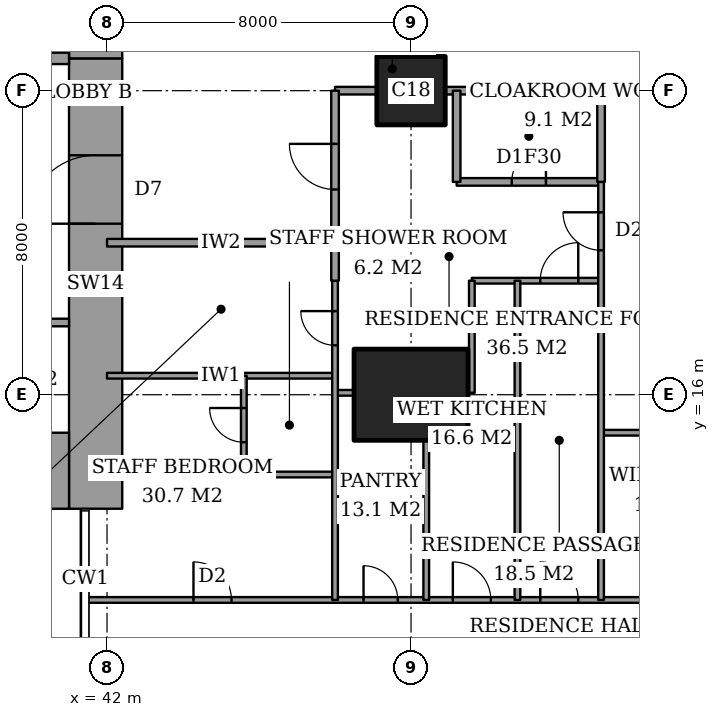
"""IFC4 building model, lengths in metres.
Left out: names, types, materials, properties, quantities, classifications, styles, units other than length and angle.
Written with IfcOpenShell. Run it as: python <this file> out.ifc"""

import sys

from ifc_helpers import new_model, si_unit, direction, frame, frame_2d, origin, origin_2d, place, context, subcontext, project, spatial, rectangle, extrude, element, fill, save


model = new_model("IFC4")
c1 = context("Model", 3, precision=1e-05, world=origin(), true_north=direction((0.0, 1.0)))
c2 = subcontext(c1, "Body", "Model", "MODEL_VIEW")
j1 = project(units=[si_unit("LENGTHUNIT", "METRE"), si_unit("PLANEANGLEUNIT", "RADIAN")], contexts=[c1])
p1 = place(None, origin())
s1 = spatial("IfcSite", under=j1, at=p1, CompositionType="ELEMENT")
p2 = place(p1, origin())
s2 = spatial("IfcBuilding", under=s1, at=p2, CompositionType="ELEMENT")
p3 = place(p2, frame((0.0, 0.0, 193.0)))
s3 = spatial("IfcBuildingStorey", under=s2, at=p3, CompositionType="ELEMENT", Elevation=193.0)
p4 = place(p3, frame((50.0, 16.0, 0.0), z_axis=(0.0, 0.0, 1.0), x_axis=(1.0, 0.0, 0.0)))
e1 = element("IfcColumn", 1, at=p4, inside=s3, PredefinedType="COLUMN", context=c2, shape_type="SweptSolid", body=[
    extrude(rectangle(XDim=3.0, YDim=2.4, at=origin_2d()), origin(), (0.0, 0.0, 1.0), 3.6),
])
p5 = place(p3, frame((50.0, 24.0, 0.0), z_axis=(0.0, 0.0, 1.0), x_axis=(1.0, 0.0, 0.0)))
e2 = element("IfcColumn", 2, at=p5, inside=s3, PredefinedType="COLUMN", context=c2, shape_type="SweptSolid", body=[
    extrude(rectangle(XDim=1.8, YDim=1.8, at=origin_2d()), origin(), (0.0, 0.0, 1.0), 3.6),
])
p6 = place(p3, frame((37.85, 14.0, 0.0), z_axis=(0.0, 0.0, 1.0), x_axis=(1.0, 0.0, 0.0)))
e3 = element("IfcWall", 3, at=p6, inside=s3, PredefinedType="SHEAR", context=c2, shape_type="SweptSolid", body=[
    extrude(rectangle(XDim=3.15, YDim=2.0, at=frame_2d((1.575, 0.0))), origin(), (0.0, 0.0, 1.0), 3.6),
])
p7 = place(p3, frame((41.7, 13.0, 0.0), z_axis=(0.0, 0.0, 1.0), x_axis=(0.0, 1.0, 0.0)))
e4 = element("IfcWall", 4, at=p7, inside=s3, PredefinedType="SHEAR", context=c2, shape_type="SweptSolid", body=[
    extrude(rectangle(XDim=11.85, YDim=1.4, at=frame_2d((5.925, 0.0))), origin(), (0.0, 0.0, 1.0), 3.6),
])
p8 = place(p7, frame((7.5, 0.0, 0.0)))
e5 = element("IfcOpeningElement", 5, at=p8, cuts=e4, PredefinedType="OPENING", context=c2, shape_type="SweptSolid", body=[
    extrude(rectangle(XDim=1.8, YDim=2.4, at=frame_2d((0.9, 1.2))), frame((0.0, 0.71, 0.0), z_axis=(0.0, -1.0, 0.0), x_axis=(1.0, 0.0, 0.0)), (0.0, 0.0, 1.0), 1.42),
])
p9 = place(p3, frame((41.7, 24.85, 0.0), z_axis=(0.0, 0.0, 1.0), x_axis=(0.0, 1.0, 0.0)))
e6 = element("IfcWall", 6, at=p9, inside=s3, PredefinedType="SHEAR", context=c2, shape_type="SweptSolid", body=[
    extrude(rectangle(XDim=10.15, YDim=1.4, at=frame_2d((5.075, 0.0))), origin(), (0.0, 0.0, 1.0), 3.6),
])
p10 = place(p3, frame((37.85, 24.85, 0.0), z_axis=(0.0, 0.0, 1.0), x_axis=(1.0, 0.0, 0.0)))
e7 = element("IfcWall", 7, at=p10, inside=s3, PredefinedType="SHEAR", context=c2, shape_type="SweptSolid", body=[
    extrude(rectangle(XDim=3.15, YDim=0.3, at=frame_2d((1.575, 0.0))), origin(), (0.0, 0.0, 1.0), 3.6),
])
p11 = place(p10, frame((0.95, 0.0, 0.0)))
e8 = element("IfcOpeningElement", 8, at=p11, cuts=e7, PredefinedType="OPENING", context=c2, shape_type="SweptSolid", body=[
    extrude(rectangle(XDim=1.0, YDim=2.1, at=frame_2d((0.5, 1.05))), frame((0.0, 0.16, 0.0), z_axis=(0.0, -1.0, 0.0), x_axis=(1.0, 0.0, 0.0)), (0.0, 0.0, 1.0), 0.32),
])
p12 = place(p3, frame((41.439, 10.6, 0.0), z_axis=(0.0, 0.0, 1.0), x_axis=(1.0, 0.0, 0.0)))
e9 = element("IfcWall", 9, at=p12, inside=s3, PredefinedType="PARTITIONING", context=c2, shape_type="SweptSolid", body=[
    extrude(rectangle(XDim=25.011, YDim=0.15, at=frame_2d((12.505, 0.0))), origin(), (0.0, 0.0, 1.0), 3.35),
])
p13 = place(p12, frame((11.961, 0.0, 0.0)))
e10 = element("IfcOpeningElement", 10, at=p13, cuts=e9, PredefinedType="OPENING", context=c2, shape_type="SweptSolid", body=[
    extrude(rectangle(XDim=1.0, YDim=2.1, at=frame_2d((0.5, 1.05))), frame((0.0, 0.085, 0.0), z_axis=(0.0, -1.0, 0.0), x_axis=(1.0, 0.0, 0.0)), (0.0, 0.0, 1.0), 0.17),
])
p14 = place(p12, frame((20.924, 0.0, 0.0)))
e11 = element("IfcOpeningElement", 11, at=p14, cuts=e9, PredefinedType="OPENING", context=c2, shape_type="SweptSolid", body=[
    extrude(rectangle(XDim=1.0, YDim=2.1, at=frame_2d((0.5, 1.05))), frame((0.0, 0.085, 0.0), z_axis=(0.0, -1.0, 0.0), x_axis=(1.0, 0.0, 0.0)), (0.0, 0.0, 1.0), 0.17),
])
p15 = place(p12, frame((15.249, 0.0, 0.0)))
e12 = element("IfcOpeningElement", 12, at=p15, cuts=e9, PredefinedType="OPENING", context=c2, shape_type="SweptSolid", body=[
    extrude(rectangle(XDim=0.9, YDim=2.1, at=frame_2d((0.45, 1.05))), frame((0.0, 0.085, 0.0), z_axis=(0.0, -1.0, 0.0), x_axis=(1.0, 0.0, 0.0)), (0.0, 0.0, 1.0), 0.17),
])
p16 = place(p12, frame((9.661, 0.0, 0.0)))
e13 = element("IfcOpeningElement", 13, at=p16, cuts=e9, PredefinedType="OPENING", context=c2, shape_type="SweptSolid", body=[
    extrude(rectangle(XDim=1.0, YDim=2.1, at=frame_2d((0.5, 1.05))), frame((0.0, 0.085, 0.0), z_axis=(0.0, -1.0, 0.0), x_axis=(1.0, 0.0, 0.0)), (0.0, 0.0, 1.0), 0.17),
])
p17 = place(p12, frame((7.311, 0.0, 0.0)))
e14 = element("IfcOpeningElement", 14, at=p17, cuts=e9, PredefinedType="OPENING", context=c2, shape_type="SweptSolid", body=[
    extrude(rectangle(XDim=0.9, YDim=2.1, at=frame_2d((0.45, 1.05))), frame((0.0, 0.085, 0.0), z_axis=(0.0, -1.0, 0.0), x_axis=(1.0, 0.0, 0.0)), (0.0, 0.0, 1.0), 0.17),
])
p18 = place(p12, frame((2.836, 0.0, 0.0)))
e15 = element("IfcOpeningElement", 15, at=p18, cuts=e9, PredefinedType="OPENING", context=c2, shape_type="SweptSolid", body=[
    extrude(rectangle(XDim=1.0, YDim=2.1, at=frame_2d((0.5, 1.05))), frame((0.0, 0.085, 0.0), z_axis=(0.0, -1.0, 0.0), x_axis=(1.0, 0.0, 0.0)), (0.0, 0.0, 1.0), 0.17),
])
p19 = place(p3, frame((45.6, 13.9, 0.0), z_axis=(0.0, 0.0, 1.0), x_axis=(1.0, 0.0, 0.0)))
e16 = element("IfcWall", 16, at=p19, inside=s3, PredefinedType="PARTITIONING", context=c2, shape_type="SweptSolid", body=[
    extrude(rectangle(XDim=2.4, YDim=0.15, at=frame_2d((1.2, 0.0))), origin(), (0.0, 0.0, 1.0), 3.35),
])
p20 = place(p3, frame((55.0, 15.0, 0.0), z_axis=(0.0, 0.0, 1.0), x_axis=(1.0, 0.0, 0.0)))
e17 = element("IfcWall", 17, at=p20, inside=s3, PredefinedType="PARTITIONING", context=c2, shape_type="SweptSolid", body=[
    extrude(rectangle(XDim=1.5, YDim=0.15, at=frame_2d((0.75, 0.0))), origin(), (0.0, 0.0, 1.0), 3.35),
])
p21 = place(p3, frame((48.0, 16.05, 0.0), z_axis=(0.0, 0.0, 1.0), x_axis=(1.0, 0.0, 0.0)))
e18 = element("IfcWall", 18, at=p21, inside=s3, PredefinedType="PARTITIONING", context=c2, shape_type="SweptSolid", body=[
    extrude(rectangle(XDim=0.5, YDim=0.15, at=frame_2d((0.25, 0.0))), origin(), (0.0, 0.0, 1.0), 2.634),
])
p22 = place(p3, frame((42.0, 16.5, 0.0), z_axis=(0.0, 0.0, 1.0), x_axis=(1.0, 0.0, 0.0)))
e19 = element("IfcWall", 19, at=p22, inside=s3, PredefinedType="PARTITIONING", context=c2, shape_type="SweptSolid", body=[
    extrude(rectangle(XDim=6.0, YDim=0.15, at=frame_2d((3.0, 0.0))), origin(), (0.0, 0.0, 1.0), 3.35),
])
p23 = place(p3, frame((51.6, 19.0, 0.0), z_axis=(0.0, 0.0, 1.0), x_axis=(1.0, 0.0, 0.0)))
e20 = element("IfcWall", 20, at=p23, inside=s3, PredefinedType="PARTITIONING", context=c2, shape_type="SweptSolid", body=[
    extrude(rectangle(XDim=3.4, YDim=0.15, at=frame_2d((1.7, 0.0))), origin(), (0.0, 0.0, 1.0), 3.35),
])
p24 = place(p23, frame((1.8, 0.0, 0.0)))
e21 = element("IfcOpeningElement", 21, at=p24, cuts=e20, PredefinedType="OPENING", context=c2, shape_type="SweptSolid", body=[
    extrude(rectangle(XDim=1.0, YDim=2.1, at=frame_2d((0.5, 1.05))), frame((0.0, 0.085, 0.0), z_axis=(0.0, -1.0, 0.0), x_axis=(1.0, 0.0, 0.0)), (0.0, 0.0, 1.0), 0.17),
])
p25 = place(p3, frame((42.0, 20.0, 0.0), z_axis=(0.0, 0.0, 1.0), x_axis=(1.0, 0.0, 0.0)))
e22 = element("IfcWall", 22, at=p25, inside=s3, PredefinedType="PARTITIONING", context=c2, shape_type="SweptSolid", body=[
    extrude(rectangle(XDim=6.0, YDim=0.2, at=frame_2d((3.0, 0.0))), origin(), (0.0, 0.0, 1.0), 3.35),
])
p26 = place(p3, frame((51.2, 21.6, 0.0), z_axis=(0.0, 0.0, 1.0), x_axis=(1.0, 0.0, 0.0)))
e23 = element("IfcWall", 23, at=p26, inside=s3, PredefinedType="PARTITIONING", context=c2, shape_type="SweptSolid", body=[
    extrude(rectangle(XDim=3.8, YDim=0.2, at=frame_2d((1.9, 0.0))), origin(), (0.0, 0.0, 1.0), 3.35),
])
p27 = place(p26, frame((1.45, 0.0, 0.0)))
e24 = element("IfcOpeningElement", 24, at=p27, cuts=e23, PredefinedType="OPENING", context=c2, shape_type="SweptSolid", body=[
    extrude(rectangle(XDim=0.9, YDim=2.1, at=frame_2d((0.45, 1.05))), frame((0.0, 0.11, 0.0), z_axis=(0.0, -1.0, 0.0), x_axis=(1.0, 0.0, 0.0)), (0.0, 0.0, 1.0), 0.22),
])
p28 = place(p3, frame((48.0, 24.0, 0.0), z_axis=(0.0, 0.0, 1.0), x_axis=(1.0, 0.0, 0.0)))
e25 = element("IfcWall", 25, at=p28, inside=s3, PredefinedType="PARTITIONING", context=c2, shape_type="SweptSolid", body=[
    extrude(rectangle(XDim=1.1, YDim=0.2, at=frame_2d((0.55, 0.0))), origin(), (0.0, 0.0, 1.0), 3.35),
])
p29 = place(p3, frame((50.9, 24.0, 0.0), z_axis=(0.0, 0.0, 1.0), x_axis=(1.0, 0.0, 0.0)))
e26 = element("IfcWall", 26, at=p29, inside=s3, PredefinedType="PARTITIONING", context=c2, shape_type="SweptSolid", body=[
    extrude(rectangle(XDim=6.2, YDim=0.2, at=frame_2d((3.1, 0.0))), origin(), (0.0, 0.0, 1.0), 3.35),
])
p30 = place(p3, frame((45.6, 13.9, 0.0), z_axis=(0.0, 0.0, 1.0), x_axis=(0.0, 1.0, 0.0)))
e27 = element("IfcWall", 27, at=p30, inside=s3, PredefinedType="PARTITIONING", context=c2, shape_type="SweptSolid", body=[
    extrude(rectangle(XDim=2.6, YDim=0.15, at=frame_2d((1.3, 0.0))), origin(), (0.0, 0.0, 1.0), 3.35),
])
p31 = place(p30, frame((0.85, 0.0, 0.0)))
e28 = element("IfcOpeningElement", 28, at=p31, cuts=e27, PredefinedType="OPENING", context=c2, shape_type="SweptSolid", body=[
    extrude(rectangle(XDim=0.9, YDim=2.1, at=frame_2d((0.45, 1.05))), frame((0.0, 0.085, 0.0), z_axis=(0.0, -1.0, 0.0), x_axis=(1.0, 0.0, 0.0)), (0.0, 0.0, 1.0), 0.17),
])
p32 = place(p3, frame((48.0, 19.0, 0.0), z_axis=(0.0, 0.0, 1.0), x_axis=(0.0, 1.0, 0.0)))
e29 = element("IfcWall", 29, at=p32, inside=s3, PredefinedType="PARTITIONING", context=c2, shape_type="SweptSolid", body=[
    extrude(rectangle(XDim=5.0, YDim=0.2, at=frame_2d((2.5, 0.0))), origin(), (0.0, 0.0, 1.0), 3.35),
])
p33 = place(p32, frame((2.4, 0.0, 0.0)))
e30 = element("IfcOpeningElement", 30, at=p33, cuts=e29, PredefinedType="OPENING", context=c2, shape_type="SweptSolid", body=[
    extrude(rectangle(XDim=1.2, YDim=2.4, at=frame_2d((0.6, 1.2))), frame((0.0, 0.11, 0.0), z_axis=(0.0, -1.0, 0.0), x_axis=(1.0, 0.0, 0.0)), (0.0, 0.0, 1.0), 0.22),
])
p34 = place(p3, frame((48.0, 10.6, 0.0), z_axis=(0.0, 0.0, 1.0), x_axis=(0.0, 1.0, 0.0)))
e31 = element("IfcWall", 31, at=p34, inside=s3, PredefinedType="PARTITIONING", context=c2, shape_type="SweptSolid", body=[
    extrude(rectangle(XDim=8.4, YDim=0.15, at=frame_2d((4.2, 0.0))), origin(), (0.0, 0.0, 1.0), 3.35),
])
p35 = place(p34, frame((6.7, 0.0, 0.0)))
e32 = element("IfcOpeningElement", 32, at=p35, cuts=e31, PredefinedType="OPENING", context=c2, shape_type="SweptSolid", body=[
    extrude(rectangle(XDim=0.9, YDim=2.1, at=frame_2d((0.45, 1.05))), frame((0.0, 0.085, 0.0), z_axis=(0.0, -1.0, 0.0), x_axis=(1.0, 0.0, 0.0)), (0.0, 0.0, 1.0), 0.17),
])
p36 = place(p3, frame((50.4, 10.6, 0.0), z_axis=(0.0, 0.0, 1.0), x_axis=(0.0, 1.0, 0.0)))
e33 = element("IfcWall", 33, at=p36, inside=s3, PredefinedType="PARTITIONING", context=c2, shape_type="SweptSolid", body=[
    extrude(rectangle(XDim=4.2, YDim=0.15, at=frame_2d((2.1, 0.0))), origin(), (0.0, 0.0, 1.0), 3.35),
])
p37 = place(p3, frame((51.2, 21.6, 0.0), z_axis=(0.0, 0.0, 1.0), x_axis=(0.0, 1.0, 0.0)))
e34 = element("IfcWall", 34, at=p37, inside=s3, PredefinedType="PARTITIONING", context=c2, shape_type="SweptSolid", body=[
    extrude(rectangle(XDim=2.4, YDim=0.2, at=frame_2d((1.2, 0.0))), origin(), (0.0, 0.0, 1.0), 3.35),
])
p38 = place(p3, frame((51.6, 16.05, 0.0), z_axis=(0.0, 0.0, 1.0), x_axis=(0.0, 1.0, 0.0)))
e35 = element("IfcWall", 35, at=p38, inside=s3, PredefinedType="PARTITIONING", context=c2, shape_type="SweptSolid", body=[
    extrude(rectangle(XDim=2.95, YDim=0.15, at=frame_2d((1.475, 0.0))), origin(), (0.0, 0.0, 1.0), 3.35),
])
p39 = place(p3, frame((52.8, 10.6, 0.0), z_axis=(0.0, 0.0, 1.0), x_axis=(0.0, 1.0, 0.0)))
e36 = element("IfcWall", 36, at=p39, inside=s3, PredefinedType="PARTITIONING", context=c2, shape_type="SweptSolid", body=[
    extrude(rectangle(XDim=8.4, YDim=0.15, at=frame_2d((4.2, 0.0))), origin(), (0.0, 0.0, 1.0), 3.35),
])
p40 = place(p3, frame((55.0, 21.6, 0.0), z_axis=(0.0, 0.0, 1.0), x_axis=(0.0, 1.0, 0.0)))
e37 = element("IfcWall", 37, at=p40, inside=s3, PredefinedType="PARTITIONING", context=c2, shape_type="SweptSolid", body=[
    extrude(rectangle(XDim=2.4, YDim=0.2, at=frame_2d((1.2, 0.0))), origin(), (0.0, 0.0, 1.0), 3.35),
])
p41 = place(p3, frame((55.0, 10.6, 0.0), z_axis=(0.0, 0.0, 1.0), x_axis=(0.0, 1.0, 0.0)))
e38 = element("IfcWall", 38, at=p41, inside=s3, PredefinedType="PARTITIONING", context=c2, shape_type="SweptSolid", body=[
    extrude(rectangle(XDim=11.0, YDim=0.15, at=frame_2d((5.5, 0.0))), origin(), (0.0, 0.0, 1.0), 3.35),
])
p42 = place(p41, frame((9.2, 0.0, 0.0)))
e39 = element("IfcOpeningElement", 39, at=p42, cuts=e38, PredefinedType="OPENING", context=c2, shape_type="SweptSolid", body=[
    extrude(rectangle(XDim=1.0, YDim=2.1, at=frame_2d((0.5, 1.05))), frame((0.0, 0.085, 0.0), z_axis=(0.0, -1.0, 0.0), x_axis=(1.0, 0.0, 0.0)), (0.0, 0.0, 1.0), 0.17),
])
p43 = place(p3, frame((28.3, 17.9, 0.0), z_axis=(0.0, 0.0, 1.0), x_axis=(1.0, 0.0, 0.0)))
e40 = element("IfcWall", 40, at=p43, inside=s3, PredefinedType="PARTITIONING", context=c2, shape_type="SweptSolid", body=[
    extrude(rectangle(XDim=12.7, YDim=0.2, at=frame_2d((6.35, 0.0))), origin(), (0.0, 0.0, 1.0), 3.6),
])
p44 = place(p43, frame((1.05, 0.0, 0.0)))
e41 = element("IfcOpeningElement", 41, at=p44, cuts=e40, PredefinedType="OPENING", context=c2, shape_type="SweptSolid", body=[
    extrude(rectangle(XDim=0.9, YDim=2.1, at=frame_2d((0.45, 1.05))), frame((0.0, 0.11, 0.0), z_axis=(0.0, -1.0, 0.0), x_axis=(1.0, 0.0, 0.0)), (0.0, 0.0, 1.0), 0.22),
])
p45 = place(p43, frame((4.2, 0.0, 0.0)))
e42 = element("IfcOpeningElement", 42, at=p45, cuts=e40, PredefinedType="OPENING", context=c2, shape_type="SweptSolid", body=[
    extrude(rectangle(XDim=1.0, YDim=2.1, at=frame_2d((0.5, 1.05))), frame((0.0, 0.11, 0.0), z_axis=(0.0, -1.0, 0.0), x_axis=(1.0, 0.0, 0.0)), (0.0, 0.0, 1.0), 0.22),
])
p46 = place(p43, frame((10.6, 0.0, 0.0)))
e43 = element("IfcOpeningElement", 43, at=p46, cuts=e40, PredefinedType="OPENING", context=c2, shape_type="SweptSolid", body=[
    extrude(rectangle(XDim=1.2, YDim=2.1, at=frame_2d((0.6, 1.05))), frame((0.0, 0.11, 0.0), z_axis=(0.0, -1.0, 0.0), x_axis=(1.0, 0.0, 0.0)), (0.0, 0.0, 1.0), 0.22),
])
p47 = place(p13, origin())
e44 = element("IfcDoor", 44, at=p47, inside=s3, OperationType="SINGLE_SWING_RIGHT", PredefinedType="DOOR", context=c2, shape_type="SweptSolid", body=[
    extrude(rectangle(XDim=1.0, YDim=2.1, at=frame_2d((0.5, 1.05))), frame((0.0, 0.025, 0.0), z_axis=(0.0, -1.0, 0.0), x_axis=(1.0, 0.0, 0.0)), (0.0, 0.0, 1.0), 0.05),
])
fill(e10, e44)
p48 = place(p42, origin())
e45 = element("IfcDoor", 45, at=p48, inside=s3, OperationType="SINGLE_SWING_LEFT", PredefinedType="DOOR", context=c2, shape_type="SweptSolid", body=[
    extrude(rectangle(XDim=1.0, YDim=2.1, at=frame_2d((0.5, 1.05))), frame((0.0, 0.025, 0.0), z_axis=(0.0, -1.0, 0.0), x_axis=(1.0, 0.0, 0.0)), (0.0, 0.0, 1.0), 0.05),
])
fill(e39, e45)
p49 = place(p27, origin())
e46 = element("IfcDoor", 46, at=p49, inside=s3, OperationType="SINGLE_SWING_LEFT", PredefinedType="DOOR", context=c2, shape_type="SweptSolid", body=[
    extrude(rectangle(XDim=0.9, YDim=2.1, at=frame_2d((0.45, 1.05))), frame((0.0, 0.025, 0.0), z_axis=(0.0, -1.0, 0.0), x_axis=(1.0, 0.0, 0.0)), (0.0, 0.0, 1.0), 0.05),
])
fill(e24, e46)
p50 = place(p33, origin())
e47 = element("IfcDoor", 47, at=p50, inside=s3, OperationType="SINGLE_SWING_LEFT", PredefinedType="DOOR", context=c2, shape_type="SweptSolid", body=[
    extrude(rectangle(XDim=1.2, YDim=2.4, at=frame_2d((0.6, 1.2))), frame((0.0, 0.025, 0.0), z_axis=(0.0, -1.0, 0.0), x_axis=(1.0, 0.0, 0.0)), (0.0, 0.0, 1.0), 0.05),
])
fill(e30, e47)
p51 = place(p24, origin())
e48 = element("IfcDoor", 48, at=p51, inside=s3, OperationType="SINGLE_SWING_LEFT", PredefinedType="DOOR", context=c2, shape_type="SweptSolid", body=[
    extrude(rectangle(XDim=1.0, YDim=2.1, at=frame_2d((0.5, 1.05))), frame((0.0, 0.025, 0.0), z_axis=(0.0, -1.0, 0.0), x_axis=(1.0, 0.0, 0.0)), (0.0, 0.0, 1.0), 0.05),
])
fill(e21, e48)
p52 = place(p16, origin())
e49 = element("IfcDoor", 49, at=p52, inside=s3, OperationType="SINGLE_SWING_RIGHT", PredefinedType="DOOR", context=c2, shape_type="SweptSolid", body=[
    extrude(rectangle(XDim=1.0, YDim=2.1, at=frame_2d((0.5, 1.05))), frame((0.0, 0.025, 0.0), z_axis=(0.0, -1.0, 0.0), x_axis=(1.0, 0.0, 0.0)), (0.0, 0.0, 1.0), 0.05),
])
fill(e13, e49)
p53 = place(p17, origin())
e50 = element("IfcDoor", 50, at=p53, inside=s3, OperationType="SINGLE_SWING_RIGHT", PredefinedType="DOOR", context=c2, shape_type="SweptSolid", body=[
    extrude(rectangle(XDim=0.9, YDim=2.1, at=frame_2d((0.45, 1.05))), frame((0.0, 0.025, 0.0), z_axis=(0.0, -1.0, 0.0), x_axis=(1.0, 0.0, 0.0)), (0.0, 0.0, 1.0), 0.05),
])
fill(e14, e50)
p54 = place(p31, origin())
e51 = element("IfcDoor", 51, at=p54, inside=s3, OperationType="SINGLE_SWING_LEFT", PredefinedType="DOOR", context=c2, shape_type="SweptSolid", body=[
    extrude(rectangle(XDim=0.9, YDim=2.1, at=frame_2d((0.45, 1.05))), frame((0.0, 0.025, 0.0), z_axis=(0.0, -1.0, 0.0), x_axis=(1.0, 0.0, 0.0)), (0.0, 0.0, 1.0), 0.05),
])
fill(e28, e51)
p55 = place(p18, origin())
e52 = element("IfcDoor", 52, at=p55, inside=s3, OperationType="SINGLE_SWING_RIGHT", PredefinedType="DOOR", context=c2, shape_type="SweptSolid", body=[
    extrude(rectangle(XDim=1.0, YDim=2.1, at=frame_2d((0.5, 1.05))), frame((0.0, 0.025, 0.0), z_axis=(0.0, -1.0, 0.0), x_axis=(1.0, 0.0, 0.0)), (0.0, 0.0, 1.0), 0.05),
])
fill(e15, e52)
p56 = place(p35, origin())
e53 = element("IfcDoor", 53, at=p56, inside=s3, OperationType="SINGLE_SWING_LEFT", PredefinedType="DOOR", context=c2, shape_type="SweptSolid", body=[
    extrude(rectangle(XDim=0.9, YDim=2.1, at=frame_2d((0.45, 1.05))), frame((0.0, 0.025, 0.0), z_axis=(0.0, -1.0, 0.0), x_axis=(1.0, 0.0, 0.0)), (0.0, 0.0, 1.0), 0.05),
])
fill(e32, e53)
p57 = place(p8, origin())
e54 = element("IfcDoor", 54, at=p57, inside=s3, OperationType="DOUBLE_DOOR_DOUBLE_SWING", PredefinedType="DOOR", context=c2, shape_type="SweptSolid", body=[
    extrude(rectangle(XDim=1.8, YDim=2.4, at=frame_2d((0.9, 1.2))), frame((0.0, 0.025, 0.0), z_axis=(0.0, -1.0, 0.0), x_axis=(1.0, 0.0, 0.0)), (0.0, 0.0, 1.0), 0.05),
])
fill(e5, e54)
save(model, sys.argv[1])
